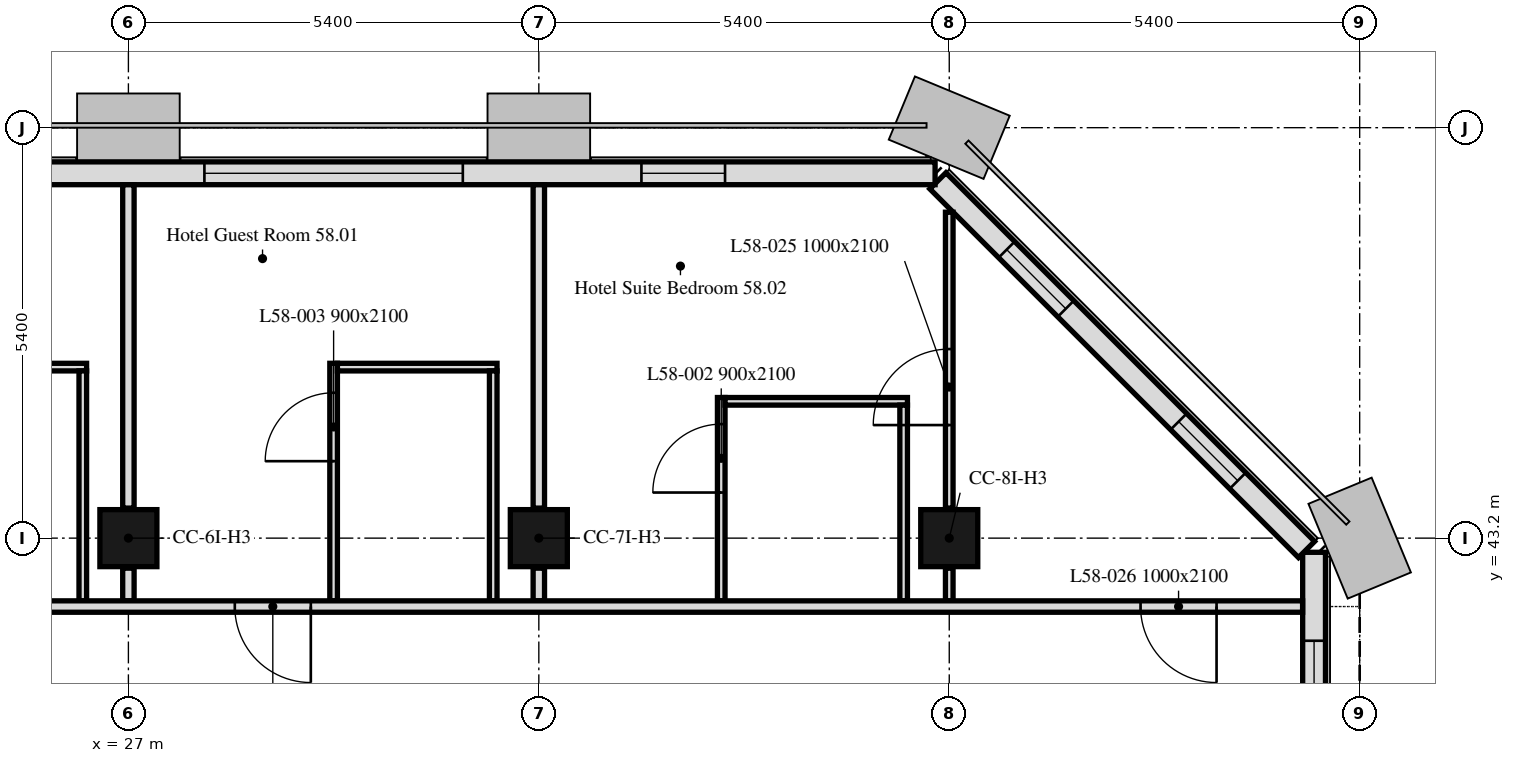
"""IFC4 building model, lengths in metres.
Left out: names, types, materials, properties, quantities, classifications, styles, units other than length and angle.
Written with IfcOpenShell. Run it as: python <this file> out.ifc"""

import sys

from ifc_helpers import new_model, si_unit, direction, frame, frame_2d, origin, origin_2d, place, context, subcontext, project, spatial, rectangle, extrude, element, fill, save


model = new_model("IFC4")
c1 = context("Model", 3, precision=1e-05, world=origin(), true_north=direction((0.0, 1.0)))
c2 = subcontext(c1, "Body", "Model", "MODEL_VIEW")
j1 = project(units=[si_unit("LENGTHUNIT", "METRE"), si_unit("PLANEANGLEUNIT", "RADIAN")], contexts=[c1])
p1 = place(None, origin())
s1 = spatial("IfcSite", under=j1, at=p1, CompositionType="ELEMENT")
p2 = place(p1, origin())
s2 = spatial("IfcBuilding", under=s1, at=p2, CompositionType="ELEMENT")
p3 = place(p2, frame((0.0, 0.0, 230.2)))
s3 = spatial("IfcBuildingStorey", under=s2, at=p3, CompositionType="ELEMENT", Elevation=230.2)
for number, where, z_axis, x_axis in (
    (1, (27.0, 43.2, 0.0), (0.0, 0.0, 1.0), (1.0, 0.0, 0.0)),
    (2, (32.4, 43.2, 0.0), (0.0, 0.0, 1.0), (1.0, 0.0, 0.0)),
    (3, (37.8, 43.2, 0.0), (0.0, 0.0, 1.0), (1.0, 0.0, 0.0)),
):
    element("IfcColumn", number, at=place(p3, frame(where, z_axis=z_axis, x_axis=x_axis)), inside=s3, PredefinedType="COLUMN", context=c2, shape_type="SweptSolid", body=[
        extrude(rectangle(XDim=0.75, YDim=0.75, at=origin_2d()), origin(), (0.0, 0.0, 1.0), 2.8),
    ])
p4 = place(p3, frame((42.6, 32.4, 0.0), z_axis=(0.0, 0.0, 1.0), x_axis=(0.0, 1.0, 0.0)))
e4 = element("IfcWall", 4, at=p4, inside=s3, PredefinedType="SOLIDWALL", context=c2, shape_type="SweptSolid", body=[
    extrude(rectangle(XDim=10.614, YDim=0.3, at=frame_2d((5.307, 0.0))), origin(), (0.0, 0.0, 1.0), 2.8),
])
p5 = place(p4, frame((1.35, 0.0, 0.9)))
e5 = element("IfcOpeningElement", 5, at=p5, cuts=e4, PredefinedType="OPENING", context=c2, shape_type="SweptSolid", body=[
    extrude(rectangle(XDim=1.1, YDim=1.7, at=frame_2d((0.55, 0.85))), frame((0.0, 0.16, 0.0), z_axis=(0.0, -1.0, 0.0), x_axis=(1.0, 0.0, 0.0)), (0.0, 0.0, 1.0), 0.32),
])
p6 = place(p4, frame((2.95, 0.0, 0.9)))
e6 = element("IfcOpeningElement", 6, at=p6, cuts=e4, PredefinedType="OPENING", context=c2, shape_type="SweptSolid", body=[
    extrude(rectangle(XDim=1.1, YDim=1.7, at=frame_2d((0.55, 0.85))), frame((0.0, 0.16, 0.0), z_axis=(0.0, -1.0, 0.0), x_axis=(1.0, 0.0, 0.0)), (0.0, 0.0, 1.0), 0.32),
])
p7 = place(p4, frame((6.75, 0.0, 0.9)))
e7 = element("IfcOpeningElement", 7, at=p7, cuts=e4, PredefinedType="OPENING", context=c2, shape_type="SweptSolid", body=[
    extrude(rectangle(XDim=1.1, YDim=1.7, at=frame_2d((0.55, 0.85))), frame((0.0, 0.16, 0.0), z_axis=(0.0, -1.0, 0.0), x_axis=(1.0, 0.0, 0.0)), (0.0, 0.0, 1.0), 0.32),
])
p8 = place(p4, frame((8.35, 0.0, 0.9)))
e8 = element("IfcOpeningElement", 8, at=p8, cuts=e4, PredefinedType="OPENING", context=c2, shape_type="SweptSolid", body=[
    extrude(rectangle(XDim=1.1, YDim=1.7, at=frame_2d((0.55, 0.85))), frame((0.0, 0.16, 0.0), z_axis=(0.0, -1.0, 0.0), x_axis=(1.0, 0.0, 0.0)), (0.0, 0.0, 1.0), 0.32),
])
p9 = place(p3, frame((42.501, 43.051, 0.0), z_axis=(0.0, 0.0, 1.0), x_axis=(-0.707106781187, 0.707106781187, 0.0)))
e9 = element("IfcWall", 9, at=p9, inside=s3, PredefinedType="SOLIDWALL", context=c2, shape_type="SweptSolid", body=[
    extrude(rectangle(XDim=6.86, YDim=0.3, at=frame_2d((3.43, 0.0))), origin(), (0.0, 0.0, 1.0), 2.8),
])
p10 = place(p9, frame((1.28, 0.0, 0.9)))
e10 = element("IfcOpeningElement", 10, at=p10, cuts=e9, PredefinedType="OPENING", context=c2, shape_type="SweptSolid", body=[
    extrude(rectangle(XDim=1.1, YDim=1.7, at=frame_2d((0.55, 0.85))), frame((0.0, 0.16, 0.0), z_axis=(0.0, -1.0, 0.0), x_axis=(1.0, 0.0, 0.0)), (0.0, 0.0, 1.0), 0.32),
])
p11 = place(p9, frame((4.48, 0.0, 0.9)))
e11 = element("IfcOpeningElement", 11, at=p11, cuts=e9, PredefinedType="OPENING", context=c2, shape_type="SweptSolid", body=[
    extrude(rectangle(XDim=1.1, YDim=1.7, at=frame_2d((0.55, 0.85))), frame((0.0, 0.16, 0.0), z_axis=(0.0, -1.0, 0.0), x_axis=(1.0, 0.0, 0.0)), (0.0, 0.0, 1.0), 0.32),
])
p12 = place(p3, frame((37.614, 48.0, 0.0), z_axis=(0.0, 0.0, 1.0), x_axis=(-1.0, 0.0, 0.0)))
e12 = element("IfcWall", 12, at=p12, inside=s3, PredefinedType="SOLIDWALL", context=c2, shape_type="SweptSolid", body=[
    extrude(rectangle(XDim=32.027, YDim=0.3, at=frame_2d((16.014, 0.0))), origin(), (0.0, 0.0, 1.0), 2.8),
])
p13 = place(p12, frame((2.764, 0.0, 0.9)))
e13 = element("IfcOpeningElement", 13, at=p13, cuts=e12, PredefinedType="OPENING", context=c2, shape_type="SweptSolid", body=[
    extrude(rectangle(XDim=1.1, YDim=1.7, at=frame_2d((0.55, 0.85))), frame((0.0, 0.16, 0.0), z_axis=(0.0, -1.0, 0.0), x_axis=(1.0, 0.0, 0.0)), (0.0, 0.0, 1.0), 0.32),
])
p14 = place(p12, frame((6.214, 0.0, 0.9)))
e14 = element("IfcOpeningElement", 14, at=p14, cuts=e12, PredefinedType="OPENING", context=c2, shape_type="SweptSolid", body=[
    extrude(rectangle(XDim=3.4, YDim=1.7, at=frame_2d((1.7, 0.85))), frame((0.0, 0.16, 0.0), z_axis=(0.0, -1.0, 0.0), x_axis=(1.0, 0.0, 0.0)), (0.0, 0.0, 1.0), 0.32),
])
p15 = place(p12, frame((13.564, 0.0, 0.9)))
e15 = element("IfcOpeningElement", 15, at=p15, cuts=e12, PredefinedType="OPENING", context=c2, shape_type="SweptSolid", body=[
    extrude(rectangle(XDim=1.1, YDim=1.7, at=frame_2d((0.55, 0.85))), frame((0.0, 0.16, 0.0), z_axis=(0.0, -1.0, 0.0), x_axis=(1.0, 0.0, 0.0)), (0.0, 0.0, 1.0), 0.32),
])
p16 = place(p12, frame((17.014, 0.0, 0.9)))
e16 = element("IfcOpeningElement", 16, at=p16, cuts=e12, PredefinedType="OPENING", context=c2, shape_type="SweptSolid", body=[
    extrude(rectangle(XDim=3.4, YDim=1.7, at=frame_2d((1.7, 0.85))), frame((0.0, 0.16, 0.0), z_axis=(0.0, -1.0, 0.0), x_axis=(1.0, 0.0, 0.0)), (0.0, 0.0, 1.0), 0.32),
])
p17 = place(p12, frame((24.364, 0.0, 0.9)))
e17 = element("IfcOpeningElement", 17, at=p17, cuts=e12, PredefinedType="OPENING", context=c2, shape_type="SweptSolid", body=[
    extrude(rectangle(XDim=1.1, YDim=1.7, at=frame_2d((0.55, 0.85))), frame((0.0, 0.16, 0.0), z_axis=(0.0, -1.0, 0.0), x_axis=(1.0, 0.0, 0.0)), (0.0, 0.0, 1.0), 0.32),
])
p18 = place(p12, frame((27.814, 0.0, 0.9)))
e18 = element("IfcOpeningElement", 18, at=p18, cuts=e12, PredefinedType="OPENING", context=c2, shape_type="SweptSolid", body=[
    extrude(rectangle(XDim=3.4, YDim=1.7, at=frame_2d((1.7, 0.85))), frame((0.0, 0.16, 0.0), z_axis=(0.0, -1.0, 0.0), x_axis=(1.0, 0.0, 0.0)), (0.0, 0.0, 1.0), 0.32),
])
p19 = place(p3, frame((32.4, 47.849, 0.0), z_axis=(0.0, 0.0, 1.0), x_axis=(0.0, -1.0, 0.0)))
e19 = element("IfcWall", 19, at=p19, inside=s3, PredefinedType="PARTITIONING", context=c2, shape_type="SweptSolid", body=[
    extrude(rectangle(XDim=4.254, YDim=0.15, at=frame_2d((2.127, 0.0))), origin(), (0.0, 0.0, 1.0), 2.2),
])
p20 = place(p3, frame((32.4, 42.805, 0.0), z_axis=(0.0, 0.0, 1.0), x_axis=(0.0, -1.0, 0.0)))
e20 = element("IfcWall", 20, at=p20, inside=s3, PredefinedType="PARTITIONING", context=c2, shape_type="SweptSolid", body=[
    extrude(rectangle(XDim=0.43, YDim=0.15, at=frame_2d((0.215, 0.0))), origin(), (0.0, 0.0, 1.0), 2.2),
])
p21 = place(p3, frame((34.8, 42.375, 0.0), z_axis=(0.0, 0.0, 1.0), x_axis=(0.0, 1.0, 0.0)))
e21 = element("IfcWall", 21, at=p21, inside=s3, PredefinedType="PARTITIONING", context=c2, shape_type="SweptSolid", body=[
    extrude(rectangle(XDim=2.675, YDim=0.1, at=frame_2d((1.337, 0.0))), origin(), (0.0, 0.0, 1.0), 2.8),
])
p22 = place(p21, frame((1.425, 0.0, 0.0)))
e22 = element("IfcOpeningElement", 22, at=p22, cuts=e21, PredefinedType="OPENING", context=c2, shape_type="SweptSolid", body=[
    extrude(rectangle(XDim=0.9, YDim=2.1, at=frame_2d((0.45, 1.05))), frame((0.0, 0.05, 0.0), z_axis=(0.0, -1.0, 0.0), x_axis=(1.0, 0.0, 0.0)), (0.0, 0.0, 1.0), 0.1),
])
p23 = place(p3, frame((34.85, 45.0, 0.0), z_axis=(0.0, 0.0, 1.0), x_axis=(1.0, 0.0, 0.0)))
e23 = element("IfcWall", 23, at=p23, inside=s3, PredefinedType="PARTITIONING", context=c2, shape_type="SweptSolid", body=[
    extrude(rectangle(XDim=2.4, YDim=0.1, at=frame_2d((1.2, 0.0))), origin(), (0.0, 0.0, 1.0), 2.8),
])
p24 = place(p3, frame((37.2, 44.95, 0.0), z_axis=(0.0, 0.0, 1.0), x_axis=(0.0, -1.0, 0.0)))
e24 = element("IfcWall", 24, at=p24, inside=s3, PredefinedType="PARTITIONING", context=c2, shape_type="SweptSolid", body=[
    extrude(rectangle(XDim=2.575, YDim=0.1, at=frame_2d((1.288, 0.0))), origin(), (0.0, 0.0, 1.0), 2.8),
])
p25 = place(p3, frame((37.8, 42.375, 0.0), z_axis=(0.0, 0.0, 1.0), x_axis=(0.0, 1.0, 0.0)))
e25 = element("IfcWall", 25, at=p25, inside=s3, PredefinedType="PARTITIONING", context=c2, shape_type="SweptSolid", body=[
    extrude(rectangle(XDim=0.43, YDim=0.1, at=frame_2d((0.215, 0.0))), origin(), (0.0, 0.0, 1.0), 2.8),
])
p26 = place(p3, frame((37.8, 43.595, 0.0), z_axis=(0.0, 0.0, 1.0), x_axis=(0.0, 1.0, 0.0)))
e26 = element("IfcWall", 26, at=p26, inside=s3, PredefinedType="PARTITIONING", context=c2, shape_type="SweptSolid", body=[
    extrude(rectangle(XDim=3.893, YDim=0.1, at=frame_2d((1.946, 0.0))), origin(), (0.0, 0.0, 1.0), 2.8),
])
p27 = place(p26, frame((1.093, 0.0, 0.0)))
e27 = element("IfcOpeningElement", 27, at=p27, cuts=e26, PredefinedType="OPENING", context=c2, shape_type="SweptSolid", body=[
    extrude(rectangle(XDim=1.0, YDim=2.1, at=frame_2d((0.5, 1.05))), frame((0.0, 0.05, 0.0), z_axis=(0.0, -1.0, 0.0), x_axis=(1.0, 0.0, 0.0)), (0.0, 0.0, 1.0), 0.1),
])
p28 = place(p3, frame((27.0, 47.849, 0.0), z_axis=(0.0, 0.0, 1.0), x_axis=(0.0, -1.0, 0.0)))
e28 = element("IfcWall", 28, at=p28, inside=s3, PredefinedType="PARTITIONING", context=c2, shape_type="SweptSolid", body=[
    extrude(rectangle(XDim=4.254, YDim=0.15, at=frame_2d((2.127, 0.0))), origin(), (0.0, 0.0, 1.0), 2.2),
])
p29 = place(p3, frame((27.0, 42.805, 0.0), z_axis=(0.0, 0.0, 1.0), x_axis=(0.0, -1.0, 0.0)))
e29 = element("IfcWall", 29, at=p29, inside=s3, PredefinedType="PARTITIONING", context=c2, shape_type="SweptSolid", body=[
    extrude(rectangle(XDim=0.43, YDim=0.15, at=frame_2d((0.215, 0.0))), origin(), (0.0, 0.0, 1.0), 2.2),
])
p30 = place(p3, frame((29.7, 42.375, 0.0), z_axis=(0.0, 0.0, 1.0), x_axis=(0.0, 1.0, 0.0)))
e30 = element("IfcWall", 30, at=p30, inside=s3, PredefinedType="PARTITIONING", context=c2, shape_type="SweptSolid", body=[
    extrude(rectangle(XDim=3.125, YDim=0.1, at=frame_2d((1.562, 0.0))), origin(), (0.0, 0.0, 1.0), 2.8),
])
p31 = place(p30, frame((1.837, 0.0, 0.0)))
e31 = element("IfcOpeningElement", 31, at=p31, cuts=e30, PredefinedType="OPENING", context=c2, shape_type="SweptSolid", body=[
    extrude(rectangle(XDim=0.9, YDim=2.1, at=frame_2d((0.45, 1.05))), frame((0.0, 0.05, 0.0), z_axis=(0.0, -1.0, 0.0), x_axis=(1.0, 0.0, 0.0)), (0.0, 0.0, 1.0), 0.1),
])
p32 = place(p3, frame((29.75, 45.45, 0.0), z_axis=(0.0, 0.0, 1.0), x_axis=(1.0, 0.0, 0.0)))
e32 = element("IfcWall", 32, at=p32, inside=s3, PredefinedType="PARTITIONING", context=c2, shape_type="SweptSolid", body=[
    extrude(rectangle(XDim=2.1, YDim=0.1, at=frame_2d((1.05, 0.0))), origin(), (0.0, 0.0, 1.0), 2.8),
])
p33 = place(p3, frame((31.8, 45.4, 0.0), z_axis=(0.0, 0.0, 1.0), x_axis=(0.0, -1.0, 0.0)))
e33 = element("IfcWall", 33, at=p33, inside=s3, PredefinedType="PARTITIONING", context=c2, shape_type="SweptSolid", body=[
    extrude(rectangle(XDim=3.025, YDim=0.1, at=frame_2d((1.512, 0.0))), origin(), (0.0, 0.0, 1.0), 2.8),
])
p34 = place(p3, frame((24.35, 45.45, 0.0), z_axis=(0.0, 0.0, 1.0), x_axis=(1.0, 0.0, 0.0)))
e34 = element("IfcWall", 34, at=p34, inside=s3, PredefinedType="PARTITIONING", context=c2, shape_type="SweptSolid", body=[
    extrude(rectangle(XDim=2.1, YDim=0.1, at=frame_2d((1.05, 0.0))), origin(), (0.0, 0.0, 1.0), 2.8),
])
p35 = place(p3, frame((26.4, 45.4, 0.0), z_axis=(0.0, 0.0, 1.0), x_axis=(0.0, -1.0, 0.0)))
e35 = element("IfcWall", 35, at=p35, inside=s3, PredefinedType="PARTITIONING", context=c2, shape_type="SweptSolid", body=[
    extrude(rectangle(XDim=3.025, YDim=0.1, at=frame_2d((1.512, 0.0))), origin(), (0.0, 0.0, 1.0), 2.8),
])
p36 = place(p3, frame((42.449, 42.3, 0.0), z_axis=(0.0, 0.0, 1.0), x_axis=(-1.0, 0.0, 0.0)))
e36 = element("IfcWall", 36, at=p36, inside=s3, PredefinedType="PARTITIONING", context=c2, shape_type="SweptSolid", body=[
    extrude(rectangle(XDim=41.698, YDim=0.15, at=frame_2d((20.849, 0.0))), origin(), (0.0, 0.0, 1.0), 2.2),
])
p37 = place(p36, frame((1.132, 0.0, 0.0)))
e37 = element("IfcOpeningElement", 37, at=p37, cuts=e36, PredefinedType="OPENING", context=c2, shape_type="SweptSolid", body=[
    extrude(rectangle(XDim=1.0, YDim=2.1, at=frame_2d((0.5, 1.05))), frame((0.0, 0.075, 0.0), z_axis=(0.0, -1.0, 0.0), x_axis=(1.0, 0.0, 0.0)), (0.0, 0.0, 1.0), 0.15),
])
p38 = place(p36, frame((13.049, 0.0, 0.0)))
e38 = element("IfcOpeningElement", 38, at=p38, cuts=e36, PredefinedType="OPENING", context=c2, shape_type="SweptSolid", body=[
    extrude(rectangle(XDim=1.0, YDim=2.1, at=frame_2d((0.5, 1.05))), frame((0.0, 0.075, 0.0), z_axis=(0.0, -1.0, 0.0), x_axis=(1.0, 0.0, 0.0)), (0.0, 0.0, 1.0), 0.15),
])
p39 = place(p36, frame((18.449, 0.0, 0.0)))
e39 = element("IfcOpeningElement", 39, at=p39, cuts=e36, PredefinedType="OPENING", context=c2, shape_type="SweptSolid", body=[
    extrude(rectangle(XDim=1.0, YDim=2.1, at=frame_2d((0.5, 1.05))), frame((0.0, 0.075, 0.0), z_axis=(0.0, -1.0, 0.0), x_axis=(1.0, 0.0, 0.0)), (0.0, 0.0, 1.0), 0.15),
])
p40 = place(p36, frame((23.049, 0.0, 0.0)))
e40 = element("IfcOpeningElement", 40, at=p40, cuts=e36, PredefinedType="OPENING", context=c2, shape_type="SweptSolid", body=[
    extrude(rectangle(XDim=1.0, YDim=2.1, at=frame_2d((0.5, 1.05))), frame((0.0, 0.075, 0.0), z_axis=(0.0, -1.0, 0.0), x_axis=(1.0, 0.0, 0.0)), (0.0, 0.0, 1.0), 0.15),
])
p41 = place(p36, frame((37.599, 0.0, 0.0)))
e41 = element("IfcOpeningElement", 41, at=p41, cuts=e36, PredefinedType="OPENING", context=c2, shape_type="SweptSolid", body=[
    extrude(rectangle(XDim=1.0, YDim=2.1, at=frame_2d((0.5, 1.05))), frame((0.0, 0.075, 0.0), z_axis=(0.0, -1.0, 0.0), x_axis=(1.0, 0.0, 0.0)), (0.0, 0.0, 1.0), 0.15),
])
p42 = place(p8, origin())
e42 = element("IfcWindow", 42, at=p42, inside=s3, PartitioningType="SINGLE_PANEL", PredefinedType="WINDOW", context=c2, shape_type="SweptSolid", body=[
    extrude(rectangle(XDim=1.1, YDim=1.7, at=frame_2d((0.55, 0.85))), frame((0.0, 0.03, 0.0), z_axis=(0.0, -1.0, 0.0), x_axis=(1.0, 0.0, 0.0)), (0.0, 0.0, 1.0), 0.06),
])
fill(e8, e42)
p43 = place(p10, origin())
e43 = element("IfcWindow", 43, at=p43, inside=s3, PartitioningType="SINGLE_PANEL", PredefinedType="WINDOW", context=c2, shape_type="SweptSolid", body=[
    extrude(rectangle(XDim=1.1, YDim=1.7, at=frame_2d((0.55, 0.85))), frame((0.0, 0.03, 0.0), z_axis=(0.0, -1.0, 0.0), x_axis=(1.0, 0.0, 0.0)), (0.0, 0.0, 1.0), 0.06),
])
fill(e10, e43)
p44 = place(p11, origin())
e44 = element("IfcWindow", 44, at=p44, inside=s3, PartitioningType="SINGLE_PANEL", PredefinedType="WINDOW", context=c2, shape_type="SweptSolid", body=[
    extrude(rectangle(XDim=1.1, YDim=1.7, at=frame_2d((0.55, 0.85))), frame((0.0, 0.03, 0.0), z_axis=(0.0, -1.0, 0.0), x_axis=(1.0, 0.0, 0.0)), (0.0, 0.0, 1.0), 0.06),
])
fill(e11, e44)
p45 = place(p13, origin())
e45 = element("IfcWindow", 45, at=p45, inside=s3, PartitioningType="SINGLE_PANEL", PredefinedType="WINDOW", context=c2, shape_type="SweptSolid", body=[
    extrude(rectangle(XDim=1.1, YDim=1.7, at=frame_2d((0.55, 0.85))), frame((0.0, 0.03, 0.0), z_axis=(0.0, -1.0, 0.0), x_axis=(1.0, 0.0, 0.0)), (0.0, 0.0, 1.0), 0.06),
])
fill(e13, e45)
p46 = place(p14, origin())
e46 = element("IfcWindow", 46, at=p46, inside=s3, PartitioningType="SINGLE_PANEL", PredefinedType="WINDOW", context=c2, shape_type="SweptSolid", body=[
    extrude(rectangle(XDim=3.4, YDim=1.7, at=frame_2d((1.7, 0.85))), frame((0.0, 0.03, 0.0), z_axis=(0.0, -1.0, 0.0), x_axis=(1.0, 0.0, 0.0)), (0.0, 0.0, 1.0), 0.06),
])
fill(e14, e46)
p47 = place(p22, origin())
e47 = element("IfcDoor", 47, at=p47, inside=s3, OperationType="SINGLE_SWING_LEFT", PredefinedType="DOOR", context=c2, shape_type="SweptSolid", body=[
    extrude(rectangle(XDim=0.9, YDim=2.1, at=frame_2d((0.45, 1.05))), frame((0.0, 0.025, 0.0), z_axis=(0.0, -1.0, 0.0), x_axis=(1.0, 0.0, 0.0)), (0.0, 0.0, 1.0), 0.05),
])
fill(e22, e47)
p48 = place(p31, origin())
e48 = element("IfcDoor", 48, at=p48, inside=s3, OperationType="SINGLE_SWING_LEFT", PredefinedType="DOOR", context=c2, shape_type="SweptSolid", body=[
    extrude(rectangle(XDim=0.9, YDim=2.1, at=frame_2d((0.45, 1.05))), frame((0.0, 0.025, 0.0), z_axis=(0.0, -1.0, 0.0), x_axis=(1.0, 0.0, 0.0)), (0.0, 0.0, 1.0), 0.05),
])
fill(e31, e48)
p49 = place(p27, origin())
e49 = element("IfcDoor", 49, at=p49, inside=s3, OperationType="SINGLE_SWING_LEFT", PredefinedType="DOOR", context=c2, shape_type="SweptSolid", body=[
    extrude(rectangle(XDim=1.0, YDim=2.1, at=frame_2d((0.5, 1.05))), frame((0.0, 0.025, 0.0), z_axis=(0.0, -1.0, 0.0), x_axis=(1.0, 0.0, 0.0)), (0.0, 0.0, 1.0), 0.05),
])
fill(e27, e49)
p50 = place(p37, origin())
e50 = element("IfcDoor", 50, at=p50, inside=s3, OperationType="SINGLE_SWING_RIGHT", PredefinedType="DOOR", context=c2, shape_type="SweptSolid", body=[
    extrude(rectangle(XDim=1.0, YDim=2.1, at=frame_2d((0.5, 1.05))), frame((0.0, 0.025, 0.0), z_axis=(0.0, -1.0, 0.0), x_axis=(1.0, 0.0, 0.0)), (0.0, 0.0, 1.0), 0.05),
])
fill(e37, e50)
p51 = place(p38, origin())
e51 = element("IfcDoor", 51, at=p51, inside=s3, OperationType="SINGLE_SWING_RIGHT", PredefinedType="DOOR", context=c2, shape_type="SweptSolid", body=[
    extrude(rectangle(XDim=1.0, YDim=2.1, at=frame_2d((0.5, 1.05))), frame((0.0, 0.025, 0.0), z_axis=(0.0, -1.0, 0.0), x_axis=(1.0, 0.0, 0.0)), (0.0, 0.0, 1.0), 0.05),
])
fill(e38, e51)
save(model, sys.argv[1])
